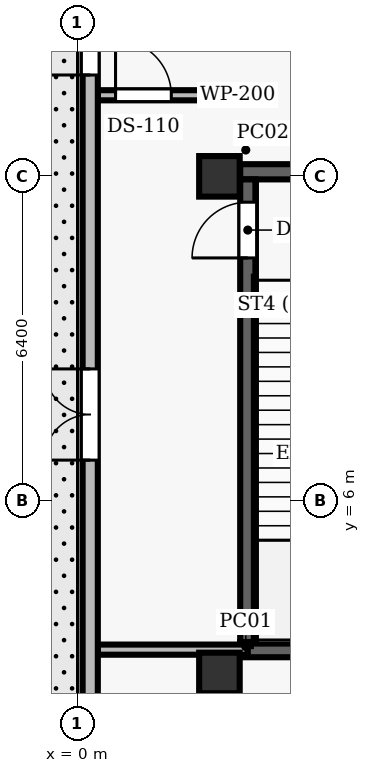
"""IFC4 building model, lengths in metres.
Left out: names, types, materials, properties, quantities, classifications, styles, units other than length and angle.
Written with IfcOpenShell. Run it as: python <this file> out.ifc"""

import sys

from ifc_helpers import new_model, si_unit, direction, frame, frame_2d, origin, origin_2d, place, context, subcontext, project, spatial, rectangle, extrude, element, fill, save


model = new_model("IFC4")
c1 = context("Model", 3, precision=1e-05, world=origin(), true_north=direction((0.0, 1.0)))
c2 = subcontext(c1, "Body", "Model", "MODEL_VIEW")
j1 = project(units=[si_unit("LENGTHUNIT", "METRE"), si_unit("PLANEANGLEUNIT", "RADIAN")], contexts=[c1])
p1 = place(None, origin())
s1 = spatial("IfcSite", under=j1, at=p1, CompositionType="ELEMENT")
p2 = place(p1, origin())
s2 = spatial("IfcBuilding", under=s1, at=p2, CompositionType="ELEMENT")
p3 = place(p2, origin())
s3 = spatial("IfcBuildingStorey", under=s2, at=p3, CompositionType="ELEMENT", Elevation=0.0)
for number, where, z_axis, x_axis in (
    (1, (2.8, 2.6, 0.0), (0.0, 0.0, 1.0), (1.0, 0.0, 0.0)),
    (2, (2.8, 12.4, 0.0), (0.0, 0.0, 1.0), (1.0, 0.0, 0.0)),
):
    element("IfcColumn", number, at=place(p3, frame(where, z_axis=z_axis, x_axis=x_axis)), inside=s3, PredefinedType="COLUMN", context=c2, shape_type="SweptSolid", body=[
        extrude(rectangle(XDim=0.8, YDim=0.8, at=origin_2d()), origin(), (0.0, 0.0, 1.0), 6.6),
    ])
for number, where, z_axis, x_axis in (
    (3, (3.21, 3.06, 0.0), (0.0, 0.0, 1.0), (1.0, 0.0, 0.0)),
    (4, (3.21, 12.49, 0.0), (0.0, 0.0, 1.0), (1.0, 0.0, 0.0)),
):
    element("IfcWall", number, at=place(p3, frame(where, z_axis=z_axis, x_axis=x_axis)), inside=s3, PredefinedType="SHEAR", context=c2, shape_type="SweptSolid", body=[
        extrude(rectangle(XDim=4.56, YDim=0.3, at=frame_2d((2.28, 0.0))), origin(), (0.0, 0.0, 1.0), 6.6),
    ])
p4 = place(p3, frame((3.36, 3.21, 0.0), z_axis=(0.0, 0.0, 1.0), x_axis=(0.0, 1.0, 0.0)))
e5 = element("IfcWall", 5, at=p4, inside=s3, PredefinedType="SHEAR", context=c2, shape_type="SweptSolid", body=[
    extrude(rectangle(XDim=9.13, YDim=0.3, at=frame_2d((4.565, 0.0))), origin(), (0.0, 0.0, 1.0), 6.6),
])
p5 = place(p4, frame((7.58, 0.0, 0.0)))
e6 = element("IfcOpeningElement", 6, at=p5, cuts=e5, PredefinedType="OPENING", context=c2, shape_type="SweptSolid", body=[
    extrude(rectangle(XDim=1.1, YDim=2.15, at=frame_2d((0.55, 1.075))), frame((0.0, 0.16, 0.0), z_axis=(0.0, -1.0, 0.0), x_axis=(1.0, 0.0, 0.0)), (0.0, 0.0, 1.0), 0.32),
])
p6 = place(p3, frame((0.4, 14.0, 0.0), z_axis=(0.0, 0.0, 1.0), x_axis=(1.0, 0.0, 0.0)))
e7 = element("IfcWall", 7, at=p6, inside=s3, PredefinedType="PARTITIONING", context=c2, shape_type="SweptSolid", body=[
    extrude(rectangle(XDim=2.96, YDim=0.2, at=frame_2d((1.48, 0.0))), origin(), (0.0, 0.0, 1.0), 5.31),
])
p7 = place(p6, frame((0.35, 0.0, 0.0)))
e8 = element("IfcOpeningElement", 8, at=p7, cuts=e7, PredefinedType="OPENING", context=c2, shape_type="SweptSolid", body=[
    extrude(rectangle(XDim=1.1, YDim=2.15, at=frame_2d((0.55, 1.075))), frame((0.0, 0.11, 0.0), z_axis=(0.0, -1.0, 0.0), x_axis=(1.0, 0.0, 0.0)), (0.0, 0.0, 1.0), 0.22),
])
p8 = place(p3, frame((0.4, 3.06, 0.0), z_axis=(0.0, 0.0, 1.0), x_axis=(1.0, 0.0, 0.0)))
e9 = element("IfcWall", 9, at=p8, inside=s3, PredefinedType="PARTITIONING", context=c2, shape_type="SweptSolid", body=[
    extrude(rectangle(XDim=2.96, YDim=0.2, at=frame_2d((1.48, 0.0))), origin(), (0.0, 0.0, 1.0), 5.31),
])
p9 = place(p3, frame((0.25, 0.4, 0.0), z_axis=(0.0, 0.0, 1.0), x_axis=(0.0, 1.0, 0.0)))
e10 = element("IfcWall", 10, at=p9, inside=s3, PredefinedType="SOLIDWALL", context=c2, shape_type="SweptSolid", body=[
    extrude(rectangle(XDim=51.2, YDim=0.3, at=frame_2d((25.6, 0.0))), origin(), (0.0, 0.0, 1.0), 5.76),
])
p10 = place(p9, frame((14.0, 0.0, 0.0)))
e11 = element("IfcOpeningElement", 11, at=p10, cuts=e10, PredefinedType="OPENING", context=c2, shape_type="SweptSolid", body=[
    extrude(rectangle(XDim=1.8, YDim=2.3, at=frame_2d((0.9, 1.15))), frame((0.0, 0.16, 0.0), z_axis=(0.0, -1.0, 0.0), x_axis=(1.0, 0.0, 0.0)), (0.0, 0.0, 1.0), 0.32),
])
p11 = place(p9, frame((19.6, 0.0, 0.0)))
e12 = element("IfcOpeningElement", 12, at=p11, cuts=e10, PredefinedType="OPENING", context=c2, shape_type="SweptSolid", body=[
    extrude(rectangle(XDim=1.8, YDim=2.3, at=frame_2d((0.9, 1.15))), frame((0.0, 0.16, 0.0), z_axis=(0.0, -1.0, 0.0), x_axis=(1.0, 0.0, 0.0)), (0.0, 0.0, 1.0), 0.32),
])
p12 = place(p9, frame((29.2, 0.0, 0.0)))
e13 = element("IfcOpeningElement", 13, at=p12, cuts=e10, PredefinedType="OPENING", context=c2, shape_type="SweptSolid", body=[
    extrude(rectangle(XDim=1.8, YDim=2.3, at=frame_2d((0.9, 1.15))), frame((0.0, 0.16, 0.0), z_axis=(0.0, -1.0, 0.0), x_axis=(1.0, 0.0, 0.0)), (0.0, 0.0, 1.0), 0.32),
])
p13 = place(p9, frame((35.2, 0.0, 0.0)))
e14 = element("IfcOpeningElement", 14, at=p13, cuts=e10, PredefinedType="OPENING", context=c2, shape_type="SweptSolid", body=[
    extrude(rectangle(XDim=1.8, YDim=2.3, at=frame_2d((0.9, 1.15))), frame((0.0, 0.16, 0.0), z_axis=(0.0, -1.0, 0.0), x_axis=(1.0, 0.0, 0.0)), (0.0, 0.0, 1.0), 0.32),
])
p14 = place(p9, frame((6.4, 0.0, 0.0)))
e15 = element("IfcOpeningElement", 15, at=p14, cuts=e10, PredefinedType="OPENING", context=c2, shape_type="SweptSolid", body=[
    extrude(rectangle(XDim=1.8, YDim=2.3, at=frame_2d((0.9, 1.15))), frame((0.0, 0.16, 0.0), z_axis=(0.0, -1.0, 0.0), x_axis=(1.0, 0.0, 0.0)), (0.0, 0.0, 1.0), 0.32),
])
p15 = place(p9, frame((42.8, 0.0, 0.0)))
e16 = element("IfcOpeningElement", 16, at=p15, cuts=e10, PredefinedType="OPENING", context=c2, shape_type="SweptSolid", body=[
    extrude(rectangle(XDim=1.8, YDim=2.3, at=frame_2d((0.9, 1.15))), frame((0.0, 0.16, 0.0), z_axis=(0.0, -1.0, 0.0), x_axis=(1.0, 0.0, 0.0)), (0.0, 0.0, 1.0), 0.32),
])
p16 = place(p5, origin())
e17 = element("IfcDoor", 17, at=p16, inside=s3, OperationType="SINGLE_SWING_LEFT", PredefinedType="DOOR", context=c2, shape_type="SweptSolid", body=[
    extrude(rectangle(XDim=1.1, YDim=2.15, at=frame_2d((0.55, 1.075))), frame((0.0, 0.025, 0.0), z_axis=(0.0, -1.0, 0.0), x_axis=(1.0, 0.0, 0.0)), (0.0, 0.0, 1.0), 0.05),
])
fill(e6, e17)
p17 = place(p7, origin())
e18 = element("IfcDoor", 18, at=p17, inside=s3, OperationType="SINGLE_SWING_LEFT", PredefinedType="DOOR", context=c2, shape_type="SweptSolid", body=[
    extrude(rectangle(XDim=1.1, YDim=2.15, at=frame_2d((0.55, 1.075))), frame((0.0, 0.025, 0.0), z_axis=(0.0, -1.0, 0.0), x_axis=(1.0, 0.0, 0.0)), (0.0, 0.0, 1.0), 0.05),
])
fill(e8, e18)
p18 = place(p10, origin())
e19 = element("IfcDoor", 19, at=p18, inside=s3, OperationType="DOUBLE_DOOR_SINGLE_SWING", PredefinedType="DOOR", context=c2, shape_type="SweptSolid", body=[
    extrude(rectangle(XDim=1.8, YDim=2.3, at=frame_2d((0.9, 1.15))), frame((0.0, 0.025, 0.0), z_axis=(0.0, -1.0, 0.0), x_axis=(1.0, 0.0, 0.0)), (0.0, 0.0, 1.0), 0.05),
])
fill(e11, e19)
p19 = place(p14, origin())
e20 = element("IfcDoor", 20, at=p19, inside=s3, OperationType="DOUBLE_DOOR_SINGLE_SWING", PredefinedType="DOOR", context=c2, shape_type="SweptSolid", body=[
    extrude(rectangle(XDim=1.8, YDim=2.3, at=frame_2d((0.9, 1.15))), frame((0.0, 0.025, 0.0), z_axis=(0.0, -1.0, 0.0), x_axis=(1.0, 0.0, 0.0)), (0.0, 0.0, 1.0), 0.05),
])
fill(e15, e20)
save(model, sys.argv[1])
